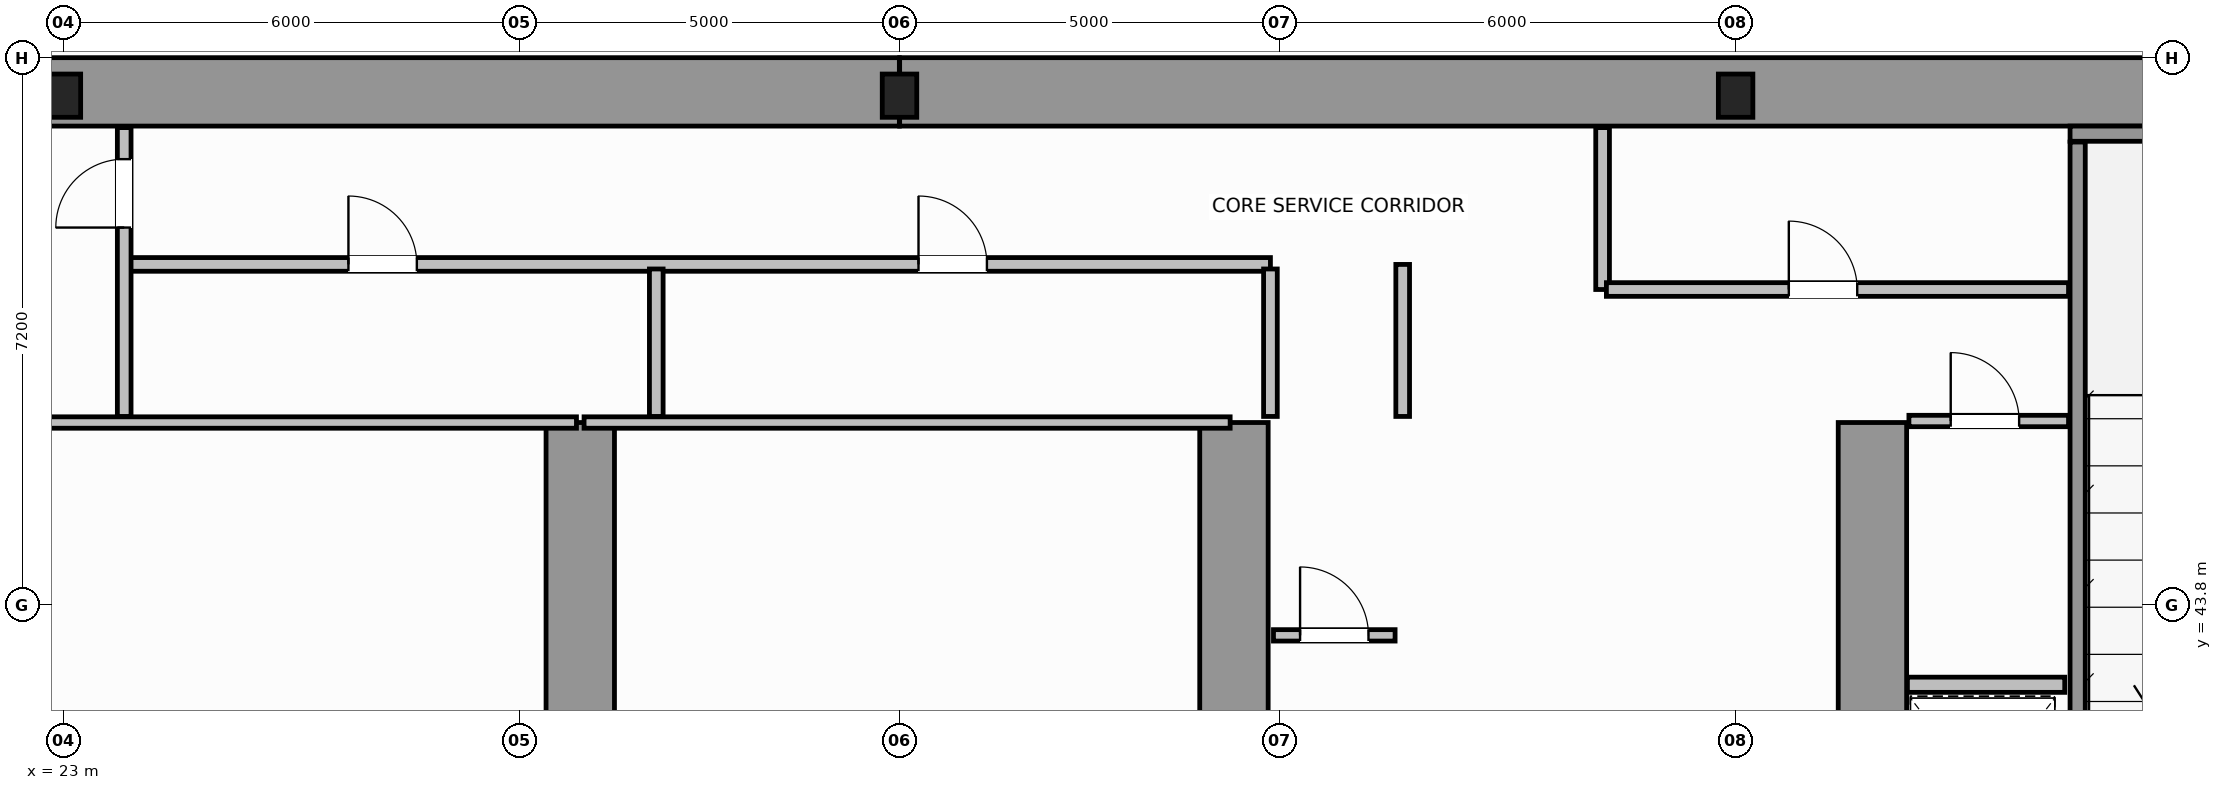
"""IFC4 building model, lengths in metres.
Left out: names, types, materials, properties, quantities, classifications, styles, units other than length and angle.
Written with IfcOpenShell. Run it as: python <this file> out.ifc"""

import sys

from ifc_helpers import new_model, si_unit, direction, frame, frame_2d, origin, origin_2d, place, context, subcontext, project, spatial, rectangle, i_section, extrude, source, transform, mapped, element, fill, save


model = new_model("IFC4")
c1 = context("Model", 3, precision=1e-05, world=origin(), true_north=direction((0.0, 1.0)))
c2 = subcontext(c1, "Body", "Model", "MODEL_VIEW")
j1 = project(units=[si_unit("LENGTHUNIT", "METRE"), si_unit("PLANEANGLEUNIT", "RADIAN")], contexts=[c1])
p1 = place(None, origin())
s1 = spatial("IfcSite", under=j1, at=p1, CompositionType="ELEMENT")
p2 = place(p1, origin())
s2 = spatial("IfcBuilding", under=s1, at=p2, CompositionType="ELEMENT")
p3 = place(p2, frame((0.0, 0.0, -5.2)))
s3 = spatial("IfcBuildingStorey", under=s2, at=p3, CompositionType="ELEMENT", Elevation=-5.2)
m1 = source(origin(), c2, "Body", "SweptSolid", [
    extrude(i_section(OverallWidth=0.454, OverallDepth=0.569, WebThickness=0.078, FlangeThickness=0.08, FilletRadius=0.015, at=origin_2d()), origin(), (0.0, 0.0, 1.0), 5.2),
])
for number, where, z_axis, x_axis in (
    (1, (23.0, 50.5, 0.0), (0.0, 0.0, 1.0), (1.0, 0.0, 0.0)),
    (2, (34.0, 50.5, 0.0), (0.0, 0.0, 1.0), (1.0, 0.0, 0.0)),
    (3, (45.0, 50.5, 0.0), (0.0, 0.0, 1.0), (1.0, 0.0, 0.0)),
):
    element("IfcColumn", number, at=place(p3, frame(where, z_axis=z_axis, x_axis=x_axis)), inside=s3, PredefinedType="COLUMN", context=c2, shape_type="MappedRepresentation", body=[
        mapped(m1, transform((0.0, 0.0, 0.0), scale=1.0)),
    ])
for number, where, z_axis, x_axis in (
    (4, (14.454, 50.55, 0.0), (0.0, 0.0, 1.0), (1.0, 0.0, 0.0)),
    (5, (34.002, 50.55, 0.0), (0.0, 0.0, 1.0), (1.0, 0.0, 0.0)),
):
    element("IfcWall", number, at=place(p3, frame(where, z_axis=z_axis, x_axis=x_axis)), inside=s3, PredefinedType="SHEAR", context=c2, shape_type="SweptSolid", body=[
        extrude(rectangle(XDim=19.544, YDim=0.9, at=frame_2d((9.772, 0.0))), origin(), (0.0, 0.0, 1.0), 5.2),
    ])
for number, where, z_axis, x_axis in (
    (6, (29.8, 36.97, 0.0), (0.0, 0.0, 1.0), (0.0, 1.0, 0.0)),
    (7, (38.4, 36.97, 0.0), (0.0, 0.0, 1.0), (0.0, 1.0, 0.0)),
    (8, (46.8, 36.97, 0.0), (0.0, 0.0, 1.0), (0.0, 1.0, 0.0)),
):
    element("IfcWall", number, at=place(p3, frame(where, z_axis=z_axis, x_axis=x_axis)), inside=s3, PredefinedType="SHEAR", context=c2, shape_type="SweptSolid", body=[
        extrude(rectangle(XDim=9.23, YDim=0.9, at=frame_2d((4.615, 0.0))), origin(), (0.0, 0.0, 1.0), 5.2),
    ])
p4 = place(p3, frame((49.4, 50.0, 0.0), z_axis=(0.0, 0.0, 1.0), x_axis=(1.0, 0.0, 0.0)))
e9 = element("IfcWall", 9, at=p4, inside=s3, PredefinedType="SOLIDWALL", context=c2, shape_type="SweptSolid", body=[
    extrude(rectangle(XDim=4.15, YDim=0.2, at=frame_2d((2.075, 0.0))), origin(), (0.0, 0.0, 1.0), 5.2),
])
p5 = place(p3, frame((49.5, 39.96, 0.0), z_axis=(0.0, 0.0, 1.0), x_axis=(0.0, 1.0, 0.0)))
e10 = element("IfcWall", 10, at=p5, inside=s3, PredefinedType="SOLIDWALL", context=c2, shape_type="SweptSolid", body=[
    extrude(rectangle(XDim=9.93, YDim=0.2, at=frame_2d((4.965, 0.0))), origin(), (0.0, 0.0, 1.0), 5.2),
])
p6 = place(p3, frame((47.26, 42.75, 0.0), z_axis=(0.0, 0.0, 1.0), x_axis=(1.0, 0.0, 0.0)))
e11 = element("IfcWall", 11, at=p6, inside=s3, PredefinedType="SOLIDWALL", context=c2, shape_type="SweptSolid", body=[
    extrude(rectangle(XDim=2.07, YDim=0.2, at=frame_2d((1.035, 0.0))), origin(), (0.0, 0.0, 1.0), 4.88),
])
for number, where, z_axis, x_axis in (
    (12, (21.25, 46.2, 0.0), (0.0, 0.0, 1.0), (1.0, 0.0, 0.0)),
    (13, (29.85, 46.2, 0.0), (0.0, 0.0, 1.0), (1.0, 0.0, 0.0)),
):
    element("IfcWall", number, at=place(p3, frame(where, z_axis=z_axis, x_axis=x_axis)), inside=s3, PredefinedType="PARTITIONING", context=c2, shape_type="SweptSolid", body=[
        extrude(rectangle(XDim=8.5, YDim=0.15, at=frame_2d((4.25, 0.0))), origin(), (0.0, 0.0, 1.0), 4.88),
    ])
p7 = place(p3, frame((47.28, 46.22, 0.0), z_axis=(0.0, 0.0, 1.0), x_axis=(1.0, 0.0, 0.0)))
e14 = element("IfcWall", 14, at=p7, inside=s3, PredefinedType="PARTITIONING", context=c2, shape_type="SweptSolid", body=[
    extrude(rectangle(XDim=2.1, YDim=0.15, at=frame_2d((1.05, 0.0))), origin(), (0.0, 0.0, 1.0), 4.88),
])
p8 = place(p7, frame((0.55, 0.0, 0.0)))
e15 = element("IfcOpeningElement", 15, at=p8, cuts=e14, PredefinedType="OPENING", context=c2, shape_type="SweptSolid", body=[
    extrude(rectangle(XDim=0.9, YDim=2.1, at=frame_2d((0.45, 1.05))), frame((0.0, 0.085, 0.0), z_axis=(0.0, -1.0, 0.0), x_axis=(1.0, 0.0, 0.0)), (0.0, 0.0, 1.0), 0.17),
])
p9 = place(p3, frame((38.92, 43.4, 0.0), z_axis=(0.0, 0.0, 1.0), x_axis=(1.0, 0.0, 0.0)))
e16 = element("IfcWall", 16, at=p9, inside=s3, PredefinedType="PARTITIONING", context=c2, shape_type="SweptSolid", body=[
    extrude(rectangle(XDim=1.6, YDim=0.15, at=frame_2d((0.8, 0.0))), origin(), (0.0, 0.0, 1.0), 4.88),
])
p10 = place(p9, frame((0.35, 0.0, 0.0)))
e17 = element("IfcOpeningElement", 17, at=p10, cuts=e16, PredefinedType="OPENING", context=c2, shape_type="SweptSolid", body=[
    extrude(rectangle(XDim=0.9, YDim=2.1, at=frame_2d((0.45, 1.05))), frame((0.0, 0.085, 0.0), z_axis=(0.0, -1.0, 0.0), x_axis=(1.0, 0.0, 0.0)), (0.0, 0.0, 1.0), 0.17),
])
p11 = place(p3, frame((23.85, 48.28, 0.0), z_axis=(0.0, 0.0, 1.0), x_axis=(1.0, 0.0, 0.0)))
e18 = element("IfcWall", 18, at=p11, inside=s3, PredefinedType="PLUMBINGWALL", context=c2, shape_type="SweptSolid", body=[
    extrude(rectangle(XDim=15.03, YDim=0.18, at=frame_2d((7.515, 0.0))), origin(), (0.0, 0.0, 1.0), 4.88),
])
p12 = place(p11, frame((2.9, 0.0, 0.0)))
e19 = element("IfcOpeningElement", 19, at=p12, cuts=e18, PredefinedType="OPENING", context=c2, shape_type="SweptSolid", body=[
    extrude(rectangle(XDim=0.9, YDim=2.15, at=frame_2d((0.45, 1.075))), frame((0.0, 0.1, 0.0), z_axis=(0.0, -1.0, 0.0), x_axis=(1.0, 0.0, 0.0)), (0.0, 0.0, 1.0), 0.2),
])
p13 = place(p11, frame((10.4, 0.0, 0.0)))
e20 = element("IfcOpeningElement", 20, at=p13, cuts=e18, PredefinedType="OPENING", context=c2, shape_type="SweptSolid", body=[
    extrude(rectangle(XDim=0.9, YDim=2.15, at=frame_2d((0.45, 1.075))), frame((0.0, 0.1, 0.0), z_axis=(0.0, -1.0, 0.0), x_axis=(1.0, 0.0, 0.0)), (0.0, 0.0, 1.0), 0.2),
])
p14 = place(p3, frame((23.8, 46.28, 0.0), z_axis=(0.0, 0.0, 1.0), x_axis=(0.0, 1.0, 0.0)))
e21 = element("IfcWall", 21, at=p14, inside=s3, PredefinedType="PLUMBINGWALL", context=c2, shape_type="SweptSolid", body=[
    extrude(rectangle(XDim=3.8, YDim=0.18, at=frame_2d((1.9, 0.0))), origin(), (0.0, 0.0, 1.0), 4.88),
])
p15 = place(p14, frame((2.485, 0.0, 0.0)))
e22 = element("IfcOpeningElement", 22, at=p15, cuts=e21, PredefinedType="OPENING", context=c2, shape_type="SweptSolid", body=[
    extrude(rectangle(XDim=0.9, YDim=2.15, at=frame_2d((0.45, 1.075))), frame((0.0, 0.1, 0.0), z_axis=(0.0, -1.0, 0.0), x_axis=(1.0, 0.0, 0.0)), (0.0, 0.0, 1.0), 0.2),
])
for number, where, z_axis, x_axis in (
    (23, (30.8, 46.28, 0.0), (0.0, 0.0, 1.0), (0.0, 1.0, 0.0)),
    (24, (38.88, 46.28, 0.0), (0.0, 0.0, 1.0), (0.0, 1.0, 0.0)),
):
    element("IfcWall", number, at=place(p3, frame(where, z_axis=z_axis, x_axis=x_axis)), inside=s3, PredefinedType="PLUMBINGWALL", context=c2, shape_type="SweptSolid", body=[
        extrude(rectangle(XDim=1.94, YDim=0.18, at=frame_2d((0.97, 0.0))), origin(), (0.0, 0.0, 1.0), 4.88),
    ])
p16 = place(p3, frame((40.62, 46.28, 0.0), z_axis=(0.0, 0.0, 1.0), x_axis=(0.0, 1.0, 0.0)))
e25 = element("IfcWall", 25, at=p16, inside=s3, PredefinedType="PLUMBINGWALL", context=c2, shape_type="SweptSolid", body=[
    extrude(rectangle(XDim=2.0, YDim=0.18, at=frame_2d((1.0, 0.0))), origin(), (0.0, 0.0, 1.0), 4.88),
])
p17 = place(p3, frame((43.25, 47.95, 0.0), z_axis=(0.0, 0.0, 1.0), x_axis=(0.0, 1.0, 0.0)))
e26 = element("IfcWall", 26, at=p17, inside=s3, PredefinedType="PLUMBINGWALL", context=c2, shape_type="SweptSolid", body=[
    extrude(rectangle(XDim=2.13, YDim=0.18, at=frame_2d((1.065, 0.0))), origin(), (0.0, 0.0, 1.0), 4.88),
])
p18 = place(p3, frame((43.3, 47.95, 0.0), z_axis=(0.0, 0.0, 1.0), x_axis=(1.0, 0.0, 0.0)))
e27 = element("IfcWall", 27, at=p18, inside=s3, PredefinedType="PLUMBINGWALL", context=c2, shape_type="SweptSolid", body=[
    extrude(rectangle(XDim=6.08, YDim=0.18, at=frame_2d((3.04, 0.0))), origin(), (0.0, 0.0, 1.0), 4.88),
])
p19 = place(p18, frame((2.4, 0.0, 0.0)))
e28 = element("IfcOpeningElement", 28, at=p19, cuts=e27, PredefinedType="OPENING", context=c2, shape_type="SweptSolid", body=[
    extrude(rectangle(XDim=0.9, YDim=2.15, at=frame_2d((0.45, 1.075))), frame((0.0, 0.1, 0.0), z_axis=(0.0, -1.0, 0.0), x_axis=(1.0, 0.0, 0.0)), (0.0, 0.0, 1.0), 0.2),
])
m2 = source(origin(), c2, "Body", "SweptSolid", [
    extrude(rectangle(XDim=0.9, YDim=2.1, at=frame_2d((0.45, 1.05))), frame((0.0, 0.025, 0.0), z_axis=(0.0, -1.0, 0.0), x_axis=(1.0, 0.0, 0.0)), (0.0, 0.0, 1.0), 0.05),
])
p20 = place(p8, origin())
e29 = element("IfcDoor", 29, at=p20, inside=s3, OperationType="SINGLE_SWING_RIGHT", PredefinedType="DOOR", context=c2, shape_type="MappedRepresentation", body=[
    mapped(m2, transform((0.0, 0.0, 0.0), scale=1.0)),
])
fill(e15, e29)
p21 = place(p10, origin())
e30 = element("IfcDoor", 30, at=p21, inside=s3, OperationType="SINGLE_SWING_LEFT", PredefinedType="DOOR", context=c2, shape_type="MappedRepresentation", body=[
    mapped(m2, transform((0.0, 0.0, 0.0), scale=1.0)),
])
fill(e17, e30)
m3 = source(origin(), c2, "Body", "SweptSolid", [
    extrude(rectangle(XDim=0.9, YDim=2.15, at=frame_2d((0.45, 1.075))), frame((0.0, 0.025, 0.0), z_axis=(0.0, -1.0, 0.0), x_axis=(1.0, 0.0, 0.0)), (0.0, 0.0, 1.0), 0.05),
])
p22 = place(p15, origin())
e31 = element("IfcDoor", 31, at=p22, inside=s3, OperationType="SINGLE_SWING_LEFT", PredefinedType="DOOR", context=c2, shape_type="MappedRepresentation", body=[
    mapped(m3, transform((0.0, 0.0, 0.0), scale=1.0)),
])
fill(e22, e31)
p23 = place(p12, origin())
e32 = element("IfcDoor", 32, at=p23, inside=s3, OperationType="SINGLE_SWING_RIGHT", PredefinedType="DOOR", context=c2, shape_type="MappedRepresentation", body=[
    mapped(m3, transform((0.0, 0.0, 0.0), scale=1.0)),
])
fill(e19, e32)
p24 = place(p13, origin())
e33 = element("IfcDoor", 33, at=p24, inside=s3, OperationType="SINGLE_SWING_LEFT", PredefinedType="DOOR", context=c2, shape_type="MappedRepresentation", body=[
    mapped(m3, transform((0.0, 0.0, 0.0), scale=1.0)),
])
fill(e20, e33)
p25 = place(p19, origin())
e34 = element("IfcDoor", 34, at=p25, inside=s3, OperationType="SINGLE_SWING_RIGHT", PredefinedType="DOOR", context=c2, shape_type="MappedRepresentation", body=[
    mapped(m3, transform((0.0, 0.0, 0.0), scale=1.0)),
])
fill(e28, e34)
save(model, sys.argv[1])
